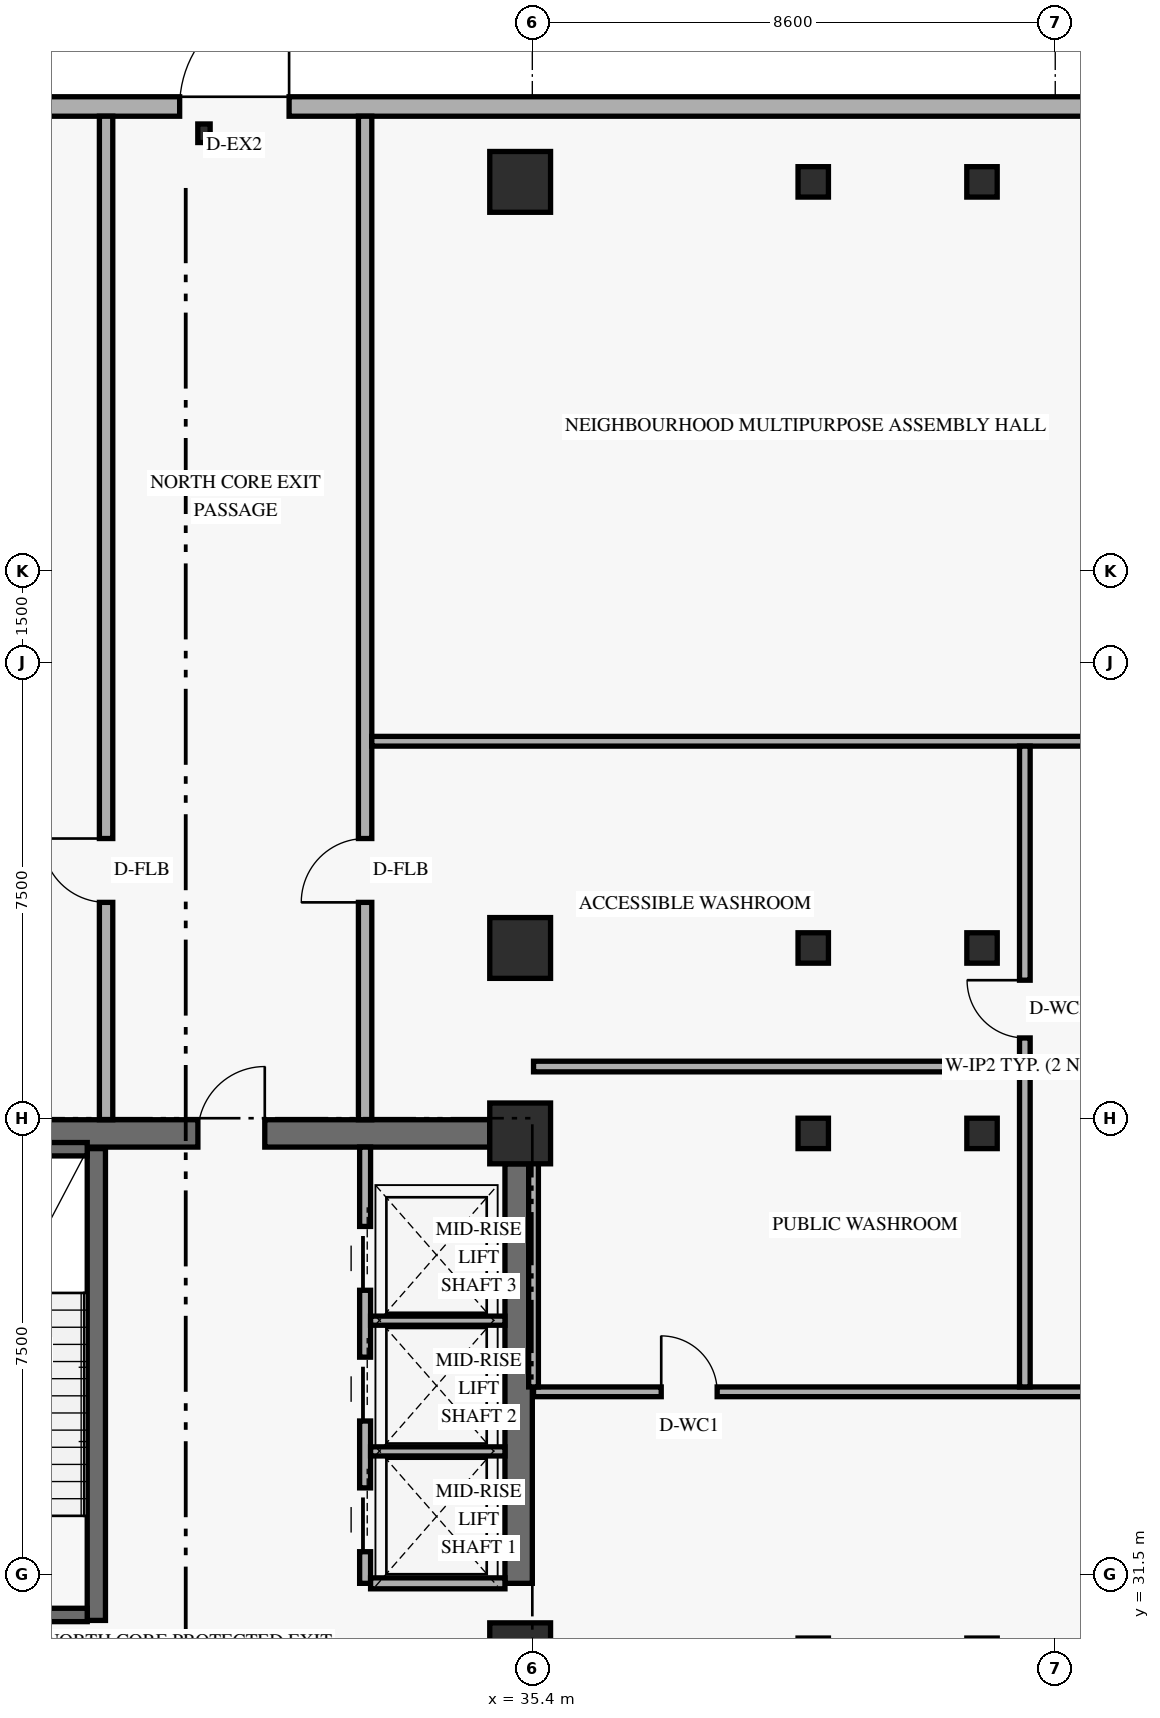
"""IFC4 building model, lengths in metres.
Left out: names, types, materials, properties, quantities, classifications, styles, units other than length and angle.
Written with IfcOpenShell. Run it as: python <this file> out.ifc"""

import sys

from ifc_helpers import new_model, si_unit, direction, frame, frame_2d, origin, origin_2d, place, context, subcontext, project, spatial, rectangle, hollow_rectangle, extrude, element, fill, save


model = new_model("IFC4")
c1 = context("Model", 3, precision=1e-05, world=origin(), true_north=direction((0.0, 1.0)))
c2 = subcontext(c1, "Body", "Model", "MODEL_VIEW")
j1 = project(units=[si_unit("LENGTHUNIT", "METRE"), si_unit("PLANEANGLEUNIT", "RADIAN")], contexts=[c1])
p1 = place(None, origin())
s1 = spatial("IfcSite", under=j1, at=p1, CompositionType="ELEMENT")
p2 = place(p1, origin())
s2 = spatial("IfcBuilding", under=s1, at=p2, CompositionType="ELEMENT")
p3 = place(p2, origin())
s3 = spatial("IfcBuildingStorey", under=s2, at=p3, CompositionType="ELEMENT", Elevation=0.0)
p4 = place(p3, frame((35.175, 31.35, 0.0), z_axis=(0.0, 0.0, 1.0), x_axis=(0.0, 1.0, 0.0)))
e1 = element("IfcWall", 1, at=p4, inside=s3, PredefinedType="SHEAR", context=c2, shape_type="SweptSolid", body=[
    extrude(rectangle(XDim=6.9, YDim=0.45, at=frame_2d((3.45, 0.0))), origin(), (0.0, 0.0, 1.0), 3.539),
])
p5 = place(p3, frame((24.7, 38.75, 0.0), z_axis=(0.0, 0.0, 1.0), x_axis=(1.0, 0.0, 0.0)))
e2 = element("IfcWall", 2, at=p5, inside=s3, PredefinedType="SHEAR", context=c2, shape_type="SweptSolid", body=[
    extrude(rectangle(XDim=10.0, YDim=0.45, at=frame_2d((5.0, 0.0))), origin(), (0.0, 0.0, 1.0), 4.39),
])
p6 = place(p5, frame((5.2, 0.0, 0.0)))
e3 = element("IfcOpeningElement", 3, at=p6, cuts=e2, PredefinedType="OPENING", context=c2, shape_type="SweptSolid", body=[
    extrude(rectangle(XDim=1.1, YDim=2.15, at=frame_2d((0.55, 1.075))), frame((0.0, 0.235, 0.0), z_axis=(0.0, -1.0, 0.0), x_axis=(1.0, 0.0, 0.0)), (0.0, 0.0, 1.0), 0.47),
])
p7 = place(p3, frame((28.23, 30.74, 0.0), z_axis=(0.0, 0.0, 1.0), x_axis=(0.0, 1.0, 0.0)))
e4 = element("IfcWall", 4, at=p7, inside=s3, PredefinedType="SHEAR", context=c2, shape_type="SweptSolid", body=[
    extrude(rectangle(XDim=7.76, YDim=0.3, at=frame_2d((3.88, 0.0))), origin(), (0.0, 0.0, 1.0), 4.39),
])
p8 = place(p3, frame((24.92, 30.83, 0.0), z_axis=(0.0, 0.0, 1.0), x_axis=(1.0, 0.0, 0.0)))
e5 = element("IfcWall", 5, at=p8, inside=s3, PredefinedType="SHEAR", context=c2, shape_type="SweptSolid", body=[
    extrude(rectangle(XDim=3.16, YDim=0.22, at=frame_2d((1.58, 0.0))), origin(), (0.0, 0.0, 1.0), 4.39),
])
p9 = place(p8, frame((0.78, 0.0, 0.0)))
e6 = element("IfcOpeningElement", 6, at=p9, cuts=e5, PredefinedType="OPENING", context=c2, shape_type="SweptSolid", body=[
    extrude(rectangle(XDim=1.05, YDim=2.15, at=frame_2d((0.525, 1.075))), frame((0.0, 0.12, 0.0), z_axis=(0.0, -1.0, 0.0), x_axis=(1.0, 0.0, 0.0)), (0.0, 0.0, 1.0), 0.24),
])
p10 = place(p3, frame((24.92, 38.49, 0.0), z_axis=(0.0, 0.0, 1.0), x_axis=(1.0, 0.0, 0.0)))
e7 = element("IfcWall", 7, at=p10, inside=s3, PredefinedType="SHEAR", context=c2, shape_type="SweptSolid", body=[
    extrude(rectangle(XDim=3.16, YDim=0.22, at=frame_2d((1.58, 0.0))), origin(), (0.0, 0.0, 1.0), 4.39),
])
for number, where, z_axis, x_axis in (
    (8, (35.2, 30.2, 0.0), (0.0, 0.0, 1.0), (1.0, 0.0, 0.0)),
    (9, (35.2, 38.75, 0.0), (0.0, 0.0, 1.0), (1.0, 0.0, 0.0)),
    (10, (35.2, 41.8, 0.0), (0.0, 0.0, 1.0), (1.0, 0.0, 0.0)),
    (11, (35.2, 54.4, 0.0), (0.0, 0.0, 1.0), (1.0, 0.0, 0.0)),
):
    element("IfcColumn", number, at=place(p3, frame(where, z_axis=z_axis, x_axis=x_axis)), inside=s3, PredefinedType="COLUMN", context=c2, shape_type="SweptSolid", body=[
        extrude(rectangle(XDim=1.0, YDim=1.0, at=origin_2d()), origin(), (0.0, 0.0, 1.0), 4.8),
    ])
for number, where, z_axis, x_axis in (
    (12, (39.936, 38.75, 0.0), (0.035, 0.0, 0.999), (0.0, 1.0, 0.0)),
    (13, (39.936, 41.8, 0.0), (0.035, 0.0, 0.999), (0.0, 1.0, 0.0)),
    (14, (39.936, 54.4, 0.0), (0.035, 0.0, 0.999), (0.0, 1.0, 0.0)),
):
    element("IfcColumn", number, at=place(p3, frame(where, z_axis=z_axis, x_axis=x_axis)), inside=s3, PredefinedType="COLUMN", context=c2, shape_type="SweptSolid", body=[
        extrude(hollow_rectangle(XDim=0.5, YDim=0.5, WallThickness=0.022, at=origin_2d()), origin(), (0.0, 0.0, 1.0), 4.803),
    ])
for number, where, z_axis, x_axis in (
    (15, (42.657, 38.75, 0.0), (0.058, 0.0, 0.998), (0.0, 1.0, 0.0)),
    (16, (42.657, 41.8, 0.0), (0.058, 0.0, 0.998), (0.0, 1.0, 0.0)),
):
    element("IfcColumn", number, at=place(p3, frame(where, z_axis=z_axis, x_axis=x_axis)), inside=s3, PredefinedType="COLUMN", context=c2, shape_type="SweptSolid", body=[
        extrude(hollow_rectangle(XDim=0.5, YDim=0.5, WallThickness=0.022, at=origin_2d()), origin(), (0.0, 0.0, 1.0), 4.808),
    ])
p11 = place(p3, frame((42.657, 54.4, 0.0), z_axis=(0.057935044615, 0.0, 0.998320354699), x_axis=(0.0, 1.0, 0.0)))
e17 = element("IfcColumn", 17, at=p11, inside=s3, PredefinedType="COLUMN", context=c2, shape_type="SweptSolid", body=[
    extrude(hollow_rectangle(XDim=0.5, YDim=0.5, WallThickness=0.022, at=origin_2d()), origin(), (0.0, 0.0, 1.0), 4.783),
])
p12 = place(p3, frame((30.0, 55.2, 0.0), z_axis=(0.0, 0.0, 1.0), x_axis=(1.0, 0.0, 0.0)))
e18 = element("IfcColumn", 18, at=p12, inside=s3, PredefinedType="PILASTER", context=c2, shape_type="SweptSolid", body=[
    extrude(hollow_rectangle(XDim=0.203, YDim=0.305, WallThickness=0.013, at=origin_2d()), origin(), (0.0, 0.0, 1.0), 4.39),
])
p13 = place(p3, frame((0.0, 55.64, 0.0), z_axis=(0.0, 0.0, 1.0), x_axis=(1.0, 0.0, 0.0)))
e19 = element("IfcWall", 19, at=p13, inside=s3, PredefinedType="SOLIDWALL", context=c2, shape_type="SweptSolid", body=[
    extrude(rectangle(XDim=56.0, YDim=0.32, at=frame_2d((28.0, 0.0))), origin(), (0.0, 0.0, 1.0), 4.39),
])
p14 = place(p13, frame((29.6, 0.0, 0.0)))
e20 = element("IfcOpeningElement", 20, at=p14, cuts=e19, PredefinedType="OPENING", context=c2, shape_type="SweptSolid", body=[
    extrude(rectangle(XDim=1.8, YDim=2.25, at=frame_2d((0.9, 1.125))), frame((0.0, 0.17, 0.0), z_axis=(0.0, -1.0, 0.0), x_axis=(1.0, 0.0, 0.0)), (0.0, 0.0, 1.0), 0.34),
])
p15 = place(p13, frame((15.2, 0.0, 0.0)))
e21 = element("IfcOpeningElement", 21, at=p15, cuts=e19, PredefinedType="OPENING", context=c2, shape_type="SweptSolid", body=[
    extrude(rectangle(XDim=2.0, YDim=2.35, at=frame_2d((1.0, 1.175))), frame((0.0, 0.17, 0.0), z_axis=(0.0, -1.0, 0.0), x_axis=(1.0, 0.0, 0.0)), (0.0, 0.0, 1.0), 0.34),
])
p16 = place(p13, frame((5.45, 0.0, 0.85)))
e22 = element("IfcOpeningElement", 22, at=p16, cuts=e19, PredefinedType="OPENING", context=c2, shape_type="SweptSolid", body=[
    extrude(rectangle(XDim=2.1, YDim=1.75, at=frame_2d((1.05, 0.875))), frame((0.0, 0.17, 0.0), z_axis=(0.0, -1.0, 0.0), x_axis=(1.0, 0.0, 0.0)), (0.0, 0.0, 1.0), 0.34),
])
p17 = place(p13, frame((20.175, 0.0, 0.85)))
e23 = element("IfcOpeningElement", 23, at=p17, cuts=e19, PredefinedType="OPENING", context=c2, shape_type="SweptSolid", body=[
    extrude(rectangle(XDim=2.1, YDim=1.75, at=frame_2d((1.05, 0.875))), frame((0.0, 0.17, 0.0), z_axis=(0.0, -1.0, 0.0), x_axis=(1.0, 0.0, 0.0)), (0.0, 0.0, 1.0), 0.34),
])
p18 = place(p13, frame((45.948, 0.0, 0.85)))
e24 = element("IfcOpeningElement", 24, at=p18, cuts=e19, PredefinedType="OPENING", context=c2, shape_type="SweptSolid", body=[
    extrude(rectangle(XDim=2.1, YDim=1.75, at=frame_2d((1.05, 0.875))), frame((0.0, 0.17, 0.0), z_axis=(0.0, -1.0, 0.0), x_axis=(1.0, 0.0, 0.0)), (0.0, 0.0, 1.0), 0.34),
])
p19 = place(p3, frame((32.65, 31.35, 0.0), z_axis=(0.0, 0.0, 1.0), x_axis=(0.0, 1.0, 0.0)))
e25 = element("IfcWall", 25, at=p19, inside=s3, PredefinedType="STANDARD", context=c2, shape_type="SweptSolid", body=[
    extrude(rectangle(XDim=7.175, YDim=0.18, at=frame_2d((3.587, 0.0))), origin(), (0.0, 0.0, 1.0), 4.39),
])
p20 = place(p19, frame((0.52, 0.0, 0.0)))
e26 = element("IfcOpeningElement", 26, at=p20, cuts=e25, PredefinedType="OPENING", context=c2, shape_type="SweptSolid", body=[
    extrude(rectangle(XDim=1.05, YDim=2.2, at=frame_2d((0.525, 1.1))), frame((0.0, 0.1, 0.0), z_axis=(0.0, -1.0, 0.0), x_axis=(1.0, 0.0, 0.0)), (0.0, 0.0, 1.0), 0.2),
])
p21 = place(p19, frame((2.67, 0.0, 0.0)))
e27 = element("IfcOpeningElement", 27, at=p21, cuts=e25, PredefinedType="OPENING", context=c2, shape_type="SweptSolid", body=[
    extrude(rectangle(XDim=1.05, YDim=2.2, at=frame_2d((0.525, 1.1))), frame((0.0, 0.1, 0.0), z_axis=(0.0, -1.0, 0.0), x_axis=(1.0, 0.0, 0.0)), (0.0, 0.0, 1.0), 0.2),
])
p22 = place(p19, frame((4.82, 0.0, 0.0)))
e28 = element("IfcOpeningElement", 28, at=p22, cuts=e25, PredefinedType="OPENING", context=c2, shape_type="SweptSolid", body=[
    extrude(rectangle(XDim=1.05, YDim=2.2, at=frame_2d((0.525, 1.1))), frame((0.0, 0.1, 0.0), z_axis=(0.0, -1.0, 0.0), x_axis=(1.0, 0.0, 0.0)), (0.0, 0.0, 1.0), 0.2),
])
p23 = place(p3, frame((32.74, 31.35, 0.0), z_axis=(0.0, 0.0, 1.0), x_axis=(1.0, 0.0, 0.0)))
e29 = element("IfcWall", 29, at=p23, inside=s3, PredefinedType="STANDARD", context=c2, shape_type="SweptSolid", body=[
    extrude(rectangle(XDim=2.21, YDim=0.18, at=frame_2d((1.105, 0.0))), origin(), (0.0, 0.0, 1.0), 4.39),
])
for number, where, z_axis, x_axis in (
    (30, (32.74, 33.52, 0.0), (0.0, 0.0, 1.0), (1.0, 0.0, 0.0)),
    (31, (32.74, 35.67, 0.0), (0.0, 0.0, 1.0), (1.0, 0.0, 0.0)),
):
    element("IfcWall", number, at=place(p3, frame(where, z_axis=z_axis, x_axis=x_axis)), inside=s3, PredefinedType="STANDARD", context=c2, shape_type="SweptSolid", body=[
        extrude(rectangle(XDim=2.21, YDim=0.15, at=frame_2d((1.105, 0.0))), origin(), (0.0, 0.0, 1.0), 4.39),
    ])
p24 = place(p3, frame((28.39, 38.975, 0.0), z_axis=(0.0, 0.0, 1.0), x_axis=(0.0, 1.0, 0.0)))
e32 = element("IfcWall", 32, at=p24, inside=s3, PredefinedType="STANDARD", context=c2, shape_type="SweptSolid", body=[
    extrude(rectangle(XDim=16.505, YDim=0.22, at=frame_2d((8.252, 0.0))), origin(), (0.0, 0.0, 1.0), 3.272),
])
p25 = place(p24, frame((3.575, 0.0, 0.0)))
e33 = element("IfcOpeningElement", 33, at=p25, cuts=e32, PredefinedType="OPENING", context=c2, shape_type="SweptSolid", body=[
    extrude(rectangle(XDim=1.05, YDim=2.15, at=frame_2d((0.525, 1.075))), frame((0.0, 0.12, 0.0), z_axis=(0.0, -1.0, 0.0), x_axis=(1.0, 0.0, 0.0)), (0.0, 0.0, 1.0), 0.24),
])
p26 = place(p3, frame((32.65, 38.975, 0.0), z_axis=(0.0, 0.0, 1.0), x_axis=(0.0, 1.0, 0.0)))
e34 = element("IfcWall", 34, at=p26, inside=s3, PredefinedType="STANDARD", context=c2, shape_type="SweptSolid", body=[
    extrude(rectangle(XDim=16.505, YDim=0.22, at=frame_2d((8.252, 0.0))), origin(), (0.0, 0.0, 1.0), 3.272),
])
p27 = place(p26, frame((3.575, 0.0, 0.0)))
e35 = element("IfcOpeningElement", 35, at=p27, cuts=e34, PredefinedType="OPENING", context=c2, shape_type="SweptSolid", body=[
    extrude(rectangle(XDim=1.05, YDim=2.15, at=frame_2d((0.525, 1.075))), frame((0.0, 0.12, 0.0), z_axis=(0.0, -1.0, 0.0), x_axis=(1.0, 0.0, 0.0)), (0.0, 0.0, 1.0), 0.24),
])
p28 = place(p3, frame((35.42, 34.5, 0.0), z_axis=(0.0, 0.0, 1.0), x_axis=(1.0, 0.0, 0.0)))
e36 = element("IfcWall", 36, at=p28, inside=s3, PredefinedType="PARTITIONING", context=c2, shape_type="SweptSolid", body=[
    extrude(rectangle(XDim=20.26, YDim=0.16, at=frame_2d((10.13, 0.0))), origin(), (0.0, 0.0, 1.0), 3.521),
])
p29 = place(p28, frame((2.1, 0.0, 0.0)))
e37 = element("IfcOpeningElement", 37, at=p29, cuts=e36, PredefinedType="OPENING", context=c2, shape_type="SweptSolid", body=[
    extrude(rectangle(XDim=0.92, YDim=2.14, at=frame_2d((0.46, 1.07))), frame((0.0, 0.09, 0.0), z_axis=(0.0, -1.0, 0.0), x_axis=(1.0, 0.0, 0.0)), (0.0, 0.0, 1.0), 0.18),
])
p30 = place(p28, frame((11.2, 0.0, 0.0)))
e38 = element("IfcOpeningElement", 38, at=p30, cuts=e36, PredefinedType="OPENING", context=c2, shape_type="SweptSolid", body=[
    extrude(rectangle(XDim=0.95, YDim=2.15, at=frame_2d((0.475, 1.075))), frame((0.0, 0.09, 0.0), z_axis=(0.0, -1.0, 0.0), x_axis=(1.0, 0.0, 0.0)), (0.0, 0.0, 1.0), 0.18),
])
p31 = place(p3, frame((35.42, 34.58, 0.0), z_axis=(0.0, 0.0, 1.0), x_axis=(0.0, 1.0, 0.0)))
e39 = element("IfcWall", 39, at=p31, inside=s3, PredefinedType="PARTITIONING", context=c2, shape_type="SweptSolid", body=[
    extrude(rectangle(XDim=4.17, YDim=0.16, at=frame_2d((2.085, 0.0))), origin(), (0.0, 0.0, 1.0), 3.521),
])
p32 = place(p3, frame((32.76, 45.2, 0.0), z_axis=(0.0, 0.0, 1.0), x_axis=(1.0, 0.0, 0.0)))
e40 = element("IfcWall", 40, at=p32, inside=s3, PredefinedType="PARTITIONING", context=c2, shape_type="SweptSolid", body=[
    extrude(rectangle(XDim=22.92, YDim=0.16, at=frame_2d((11.46, 0.0))), origin(), (0.0, 0.0, 1.0), 3.521),
])
p33 = place(p32, frame((13.89, 0.0, 0.0)))
e41 = element("IfcOpeningElement", 41, at=p33, cuts=e40, PredefinedType="OPENING", context=c2, shape_type="SweptSolid", body=[
    extrude(rectangle(XDim=1.15, YDim=2.15, at=frame_2d((0.575, 1.075))), frame((0.0, 0.09, 0.0), z_axis=(0.0, -1.0, 0.0), x_axis=(1.0, 0.0, 0.0)), (0.0, 0.0, 1.0), 0.18),
])
p34 = place(p3, frame((43.5, 34.58, 0.0), z_axis=(0.0, 0.0, 1.0), x_axis=(0.0, 1.0, 0.0)))
e42 = element("IfcWall", 42, at=p34, inside=s3, PredefinedType="PLUMBINGWALL", context=c2, shape_type="SweptSolid", body=[
    extrude(rectangle(XDim=10.54, YDim=0.175, at=frame_2d((5.27, 0.0))), origin(), (0.0, 0.0, 1.0), 3.272),
])
p35 = place(p34, frame((5.74, 0.0, 0.0)))
e43 = element("IfcOpeningElement", 43, at=p35, cuts=e42, PredefinedType="OPENING", context=c2, shape_type="SweptSolid", body=[
    extrude(rectangle(XDim=0.95, YDim=2.14, at=frame_2d((0.475, 1.07))), frame((0.0, 0.097, 0.0), z_axis=(0.0, -1.0, 0.0), x_axis=(1.0, 0.0, 0.0)), (0.0, 0.0, 1.0), 0.195),
])
p36 = place(p3, frame((35.42, 39.85, 0.0), z_axis=(0.0, 0.0, 1.0), x_axis=(1.0, 0.0, 0.0)))
e44 = element("IfcWall", 44, at=p36, inside=s3, PredefinedType="PLUMBINGWALL", context=c2, shape_type="SweptSolid", body=[
    extrude(rectangle(XDim=7.993, YDim=0.175, at=frame_2d((3.996, 0.0))), origin(), (0.0, 0.0, 1.0), 3.521),
])
p37 = place(p14, origin())
e45 = element("IfcDoor", 45, at=p37, inside=s3, OperationType="SINGLE_SWING_RIGHT", PredefinedType="DOOR", context=c2, shape_type="SweptSolid", body=[
    extrude(rectangle(XDim=1.8, YDim=2.25, at=frame_2d((0.9, 1.125))), frame((0.0, 0.025, 0.0), z_axis=(0.0, -1.0, 0.0), x_axis=(1.0, 0.0, 0.0)), (0.0, 0.0, 1.0), 0.05),
])
fill(e20, e45)
p38 = place(p20, origin())
e46 = element("IfcDoor", 46, at=p38, inside=s3, OperationType="SLIDING_TO_LEFT", PredefinedType="DOOR", context=c2, shape_type="SweptSolid", body=[
    extrude(rectangle(XDim=1.05, YDim=2.2, at=frame_2d((0.525, 1.1))), frame((0.0, 0.025, 0.0), z_axis=(0.0, -1.0, 0.0), x_axis=(1.0, 0.0, 0.0)), (0.0, 0.0, 1.0), 0.05),
])
fill(e26, e46)
p39 = place(p21, origin())
e47 = element("IfcDoor", 47, at=p39, inside=s3, OperationType="SLIDING_TO_LEFT", PredefinedType="DOOR", context=c2, shape_type="SweptSolid", body=[
    extrude(rectangle(XDim=1.05, YDim=2.2, at=frame_2d((0.525, 1.1))), frame((0.0, 0.025, 0.0), z_axis=(0.0, -1.0, 0.0), x_axis=(1.0, 0.0, 0.0)), (0.0, 0.0, 1.0), 0.05),
])
fill(e27, e47)
p40 = place(p22, origin())
e48 = element("IfcDoor", 48, at=p40, inside=s3, OperationType="SLIDING_TO_LEFT", PredefinedType="DOOR", context=c2, shape_type="SweptSolid", body=[
    extrude(rectangle(XDim=1.05, YDim=2.2, at=frame_2d((0.525, 1.1))), frame((0.0, 0.025, 0.0), z_axis=(0.0, -1.0, 0.0), x_axis=(1.0, 0.0, 0.0)), (0.0, 0.0, 1.0), 0.05),
])
fill(e28, e48)
p41 = place(p6, origin())
e49 = element("IfcDoor", 49, at=p41, inside=s3, OperationType="SINGLE_SWING_RIGHT", PredefinedType="DOOR", context=c2, shape_type="SweptSolid", body=[
    extrude(rectangle(XDim=1.1, YDim=2.15, at=frame_2d((0.55, 1.075))), frame((0.0, 0.025, 0.0), z_axis=(0.0, -1.0, 0.0), x_axis=(1.0, 0.0, 0.0)), (0.0, 0.0, 1.0), 0.05),
])
fill(e3, e49)
p42 = place(p27, origin())
e50 = element("IfcDoor", 50, at=p42, inside=s3, OperationType="SINGLE_SWING_LEFT", PredefinedType="DOOR", context=c2, shape_type="SweptSolid", body=[
    extrude(rectangle(XDim=1.05, YDim=2.15, at=frame_2d((0.525, 1.075))), frame((0.0, 0.025, 0.0), z_axis=(0.0, -1.0, 0.0), x_axis=(1.0, 0.0, 0.0)), (0.0, 0.0, 1.0), 0.05),
])
fill(e35, e50)
p43 = place(p25, origin())
e51 = element("IfcDoor", 51, at=p43, inside=s3, OperationType="SINGLE_SWING_RIGHT", PredefinedType="DOOR", context=c2, shape_type="SweptSolid", body=[
    extrude(rectangle(XDim=1.05, YDim=2.15, at=frame_2d((0.525, 1.075))), frame((0.0, 0.025, 0.0), z_axis=(0.0, -1.0, 0.0), x_axis=(1.0, 0.0, 0.0)), (0.0, 0.0, 1.0), 0.05),
])
fill(e33, e51)
p44 = place(p29, origin())
e52 = element("IfcDoor", 52, at=p44, inside=s3, OperationType="SINGLE_SWING_LEFT", PredefinedType="DOOR", context=c2, shape_type="SweptSolid", body=[
    extrude(rectangle(XDim=0.92, YDim=2.14, at=frame_2d((0.46, 1.07))), frame((0.0, 0.025, 0.0), z_axis=(0.0, -1.0, 0.0), x_axis=(1.0, 0.0, 0.0)), (0.0, 0.0, 1.0), 0.05),
])
fill(e37, e52)
p45 = place(p35, origin())
e53 = element("IfcDoor", 53, at=p45, inside=s3, OperationType="SINGLE_SWING_RIGHT", PredefinedType="DOOR", context=c2, shape_type="SweptSolid", body=[
    extrude(rectangle(XDim=0.95, YDim=2.14, at=frame_2d((0.475, 1.07))), frame((0.0, 0.025, 0.0), z_axis=(0.0, -1.0, 0.0), x_axis=(1.0, 0.0, 0.0)), (0.0, 0.0, 1.0), 0.05),
])
fill(e43, e53)
save(model, sys.argv[1])
